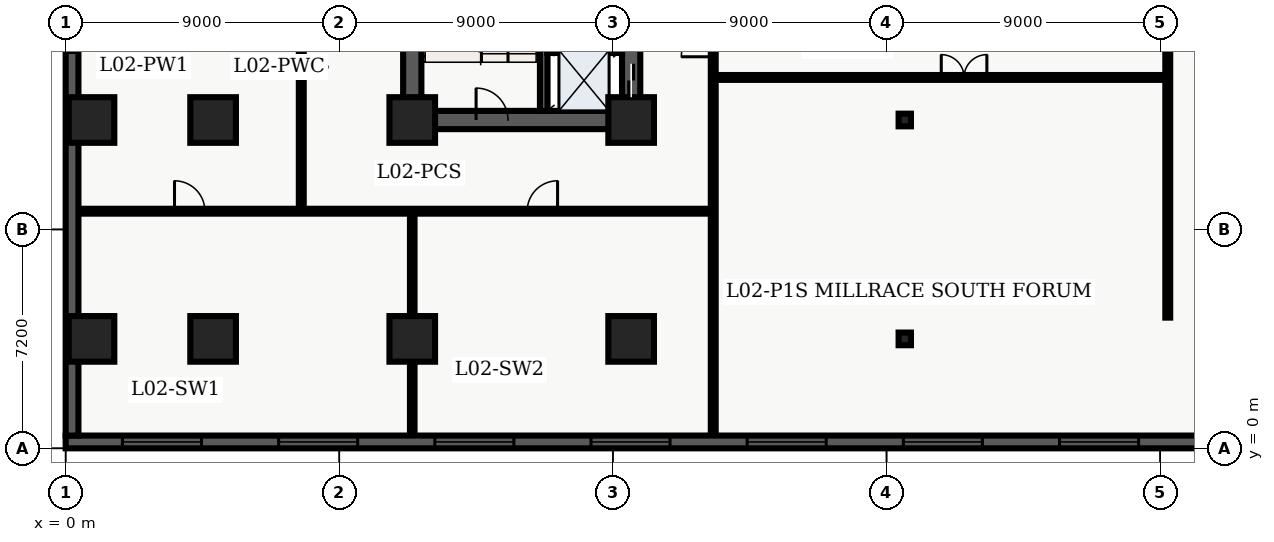
"""IFC4 building model, lengths in metres.
Left out: names, types, materials, properties, quantities, classifications, styles, units other than length and angle.
Written with IfcOpenShell. Run it as: python <this file> out.ifc"""

import sys

from ifc_helpers import new_model, entity, si_unit, converted_unit, direction, frame, origin_with_axes, origin_2d_with_axis, place, context, subcontext, project, spatial, polyline, rectangle, i_section, outline, extrude, element, fill, save


model = new_model("IFC4")
c1 = context("Model", 3, precision=1e-05, world=origin_with_axes(), true_north=direction((0.0, 1.0)))
c2 = subcontext(c1, "Body", "Model", "MODEL_VIEW")
j1 = project(units=[si_unit("LENGTHUNIT", "METRE"), converted_unit("PLANEANGLEUNIT", "DEGREE", entity("IfcPlaneAngleMeasure", 0.017), si_unit("PLANEANGLEUNIT", "RADIAN"), dimensions=[0, 0, 0, 0, 0, 0, 0])], contexts=[c1])
p1 = place(None, origin_with_axes())
s1 = spatial("IfcSite", under=j1, at=p1, CompositionType="ELEMENT")
p2 = place(p1, origin_with_axes())
s2 = spatial("IfcBuilding", under=s1, at=p2, CompositionType="ELEMENT")
p3 = place(p2, frame((0.0, 0.0, 10.8), z_axis=(0.0, 0.0, 1.0), x_axis=(1.0, 0.0, 0.0)))
s3 = spatial("IfcBuildingStorey", under=s2, at=p3, CompositionType="ELEMENT", Elevation=10.8)
p4 = place(p3, frame((11.4, 10.8, 0.0), z_axis=(0.0, 0.0, 1.0), x_axis=(0.0, 1.0, 0.0)))
e1 = element("IfcWall", 1, at=p4, inside=s3, PredefinedType="SHEAR", context=c2, shape_type="SweptSolid", body=[
    extrude(outline(polyline([(0.0, -0.3), (27.0, -0.3), (27.0, 0.3), (0.0, 0.3), (0.0, -0.3)])), origin_with_axes(), (0.0, 0.0, 1.0), 4.26),
])
p5 = place(p3, frame((11.4, 10.8, 0.0), z_axis=(0.0, 0.0, 1.0), x_axis=(1.0, 0.0, 0.0)))
e2 = element("IfcWall", 2, at=p5, inside=s3, PredefinedType="SHEAR", context=c2, shape_type="SweptSolid", body=[
    extrude(outline(polyline([(0.0, -0.3), (7.2, -0.3), (7.2, 0.3), (0.0, 0.3), (0.0, -0.3)])), origin_with_axes(), (0.0, 0.0, 1.0), 4.26),
])
p6 = place(p5, frame((2.625, 0.0, 0.0), z_axis=(0.0, 0.0, 1.0), x_axis=(1.0, 0.0, 0.0)))
e3 = element("IfcOpeningElement", 3, at=p6, cuts=e2, PredefinedType="OPENING", context=c2, shape_type="SweptSolid", body=[
    extrude(rectangle(XDim=1.05, YDim=0.62, at=origin_2d_with_axis()), origin_with_axes(), (0.0, 0.0, 1.0), 2.15),
])
p7 = place(p3, frame((18.6, 10.8, 0.0), z_axis=(0.0, 0.0, 1.0), x_axis=(0.0, 1.0, 0.0)))
e4 = element("IfcWall", 4, at=p7, inside=s3, PredefinedType="SHEAR", context=c2, shape_type="SweptSolid", body=[
    extrude(outline(polyline([(0.0, -0.3), (13.5, -0.3), (13.5, 0.3), (0.0, 0.3), (0.0, -0.3)])), origin_with_axes(), (0.0, 0.0, 1.0), 4.26),
])
p8 = place(p7, frame((1.3, 0.0, 0.0), z_axis=(0.0, 0.0, 1.0), x_axis=(1.0, 0.0, 0.0)))
e5 = element("IfcOpeningElement", 5, at=p8, cuts=e4, PredefinedType="OPENING", context=c2, shape_type="SweptSolid", body=[
    extrude(rectangle(XDim=1.1, YDim=0.62, at=origin_2d_with_axis()), origin_with_axes(), (0.0, 0.0, 1.0), 2.15),
])
p9 = place(p7, frame((3.4, 0.0, 0.0), z_axis=(0.0, 0.0, 1.0), x_axis=(1.0, 0.0, 0.0)))
e6 = element("IfcOpeningElement", 6, at=p9, cuts=e4, PredefinedType="OPENING", context=c2, shape_type="SweptSolid", body=[
    extrude(rectangle(XDim=1.1, YDim=0.62, at=origin_2d_with_axis()), origin_with_axes(), (0.0, 0.0, 1.0), 2.15),
])
p10 = place(p7, frame((11.125, 0.0, 0.0), z_axis=(0.0, 0.0, 1.0), x_axis=(1.0, 0.0, 0.0)))
e7 = element("IfcOpeningElement", 7, at=p10, cuts=e4, PredefinedType="OPENING", context=c2, shape_type="SweptSolid", body=[
    extrude(rectangle(XDim=1.05, YDim=0.62, at=origin_2d_with_axis()), origin_with_axes(), (0.0, 0.0, 1.0), 2.15),
])
p11 = place(p3, frame((15.725, 11.1, 0.0), z_axis=(0.0, 0.0, 1.0), x_axis=(0.0, 1.0, 0.0)))
e8 = element("IfcWall", 8, at=p11, inside=s3, PredefinedType="SHEAR", context=c2, shape_type="SweptSolid", body=[
    extrude(outline(polyline([(0.0, -0.125), (8.6, -0.125), (8.6, 0.125), (0.0, 0.125), (0.0, -0.125)])), origin_with_axes(), (0.0, 0.0, 1.0), 4.26),
])
for number, where, z_axis, x_axis in (
    (9, (11.4, 3.6, 0.0), (0.0, 0.0, 1.0), (1.0, 0.0, 0.0)),
    (10, (11.4, 10.8, 0.0), (0.0, 0.0, 1.0), (1.0, 0.0, 0.0)),
    (11, (18.6, 3.6, 0.0), (0.0, 0.0, 1.0), (1.0, 0.0, 0.0)),
    (12, (18.6, 10.8, 0.0), (0.0, 0.0, 1.0), (1.0, 0.0, 0.0)),
    (13, (4.85, 3.6, 0.0), (0.0, 0.0, 1.0), (1.0, 0.0, 0.0)),
    (14, (4.85, 10.8, 0.0), (0.0, 0.0, 1.0), (1.0, 0.0, 0.0)),
    (15, (0.85, 3.6, 0.0), (0.0, 0.0, 1.0), (1.0, 0.0, 0.0)),
    (16, (0.85, 10.8, 0.0), (0.0, 0.0, 1.0), (1.0, 0.0, 0.0)),
):
    element("IfcColumn", number, at=place(p3, frame(where, z_axis=z_axis, x_axis=x_axis)), inside=s3, PredefinedType="COLUMN", context=c2, shape_type="SweptSolid", body=[
        extrude(rectangle(XDim=1.5, YDim=1.5, at=origin_2d_with_axis()), origin_with_axes(), (0.0, 0.0, 1.0), 4.5),
    ])
for number, where, z_axis, x_axis in (
    (17, (27.6, 3.6, 0.0), (0.0, 0.0, 1.0), (1.0, 0.0, 0.0)),
    (18, (27.6, 10.8, 0.0), (0.0, 0.0, 1.0), (1.0, 0.0, 0.0)),
):
    element("IfcColumn", number, at=place(p3, frame(where, z_axis=z_axis, x_axis=x_axis)), inside=s3, PredefinedType="COLUMN", context=c2, shape_type="SweptSolid", body=[
        extrude(i_section(OverallWidth=0.406, OverallDepth=0.416, WebThickness=0.03, FlangeThickness=0.048, FilletRadius=0.022, at=origin_2d_with_axis()), origin_with_axes(), (0.0, 0.0, 1.0), 4.5),
    ])
p12 = place(p3, frame((15.84, 13.13, 0.0), z_axis=(0.0, 0.0, 1.0), x_axis=(1.0, 0.0, 0.0)))
e19 = element("IfcWall", 19, at=p12, inside=s3, PredefinedType="SOLIDWALL", context=c2, shape_type="SweptSolid", body=[
    extrude(outline(polyline([(0.0, -0.125), (2.46, -0.125), (2.46, 0.125), (0.0, 0.125), (0.0, -0.125)])), origin_with_axes(), (0.0, 0.0, 1.0), 3.2),
])
p13 = place(p3, frame((0.38, 7.8, 0.0), z_axis=(0.0, 0.0, 1.0), x_axis=(1.0, 0.0, 0.0)))
e20 = element("IfcWall", 20, at=p13, inside=s3, PredefinedType="PARTITIONING", context=c2, shape_type="SweptSolid", body=[
    extrude(outline(polyline([(0.0, -0.08), (20.92, -0.08), (20.92, 0.08), (0.0, 0.08), (0.0, -0.08)])), origin_with_axes(), (0.0, 0.0, 1.0), 3.2),
])
p14 = place(p13, frame((3.7, 0.0, 0.0), z_axis=(0.0, 0.0, 1.0), x_axis=(1.0, 0.0, 0.0)))
e21 = element("IfcOpeningElement", 21, at=p14, cuts=e20, PredefinedType="OPENING", context=c2, shape_type="SweptSolid", body=[
    extrude(rectangle(XDim=1.0, YDim=0.18, at=origin_2d_with_axis()), origin_with_axes(), (0.0, 0.0, 1.0), 2.15),
])
p15 = place(p13, frame((15.3, 0.0, 0.0), z_axis=(0.0, 0.0, 1.0), x_axis=(1.0, 0.0, 0.0)))
e22 = element("IfcOpeningElement", 22, at=p15, cuts=e20, PredefinedType="OPENING", context=c2, shape_type="SweptSolid", body=[
    extrude(rectangle(XDim=1.0, YDim=0.18, at=origin_2d_with_axis()), origin_with_axes(), (0.0, 0.0, 1.0), 2.15),
])
p16 = place(p3, frame((11.4, 0.38, 0.0), z_axis=(0.0, 0.0, 1.0), x_axis=(0.0, 1.0, 0.0)))
e23 = element("IfcWall", 23, at=p16, inside=s3, PredefinedType="PARTITIONING", context=c2, shape_type="SweptSolid", body=[
    extrude(outline(polyline([(0.0, -0.075), (7.42, -0.075), (7.42, 0.075), (0.0, 0.075), (0.0, -0.075)])), origin_with_axes(), (0.0, 0.0, 1.0), 3.2),
])
p17 = place(p3, frame((7.75, 7.8, 0.0), z_axis=(0.0, 0.0, 1.0), x_axis=(0.0, 1.0, 0.0)))
e24 = element("IfcWall", 24, at=p17, inside=s3, PredefinedType="PARTITIONING", context=c2, shape_type="SweptSolid", body=[
    extrude(outline(polyline([(0.0, -0.08), (32.6, -0.08), (32.6, 0.08), (0.0, 0.08), (0.0, -0.08)])), origin_with_axes(), (0.0, 0.0, 1.0), 3.2),
])
p18 = place(p17, frame((8.25, 0.0, 0.0), z_axis=(0.0, 0.0, 1.0), x_axis=(1.0, 0.0, 0.0)))
e25 = element("IfcOpeningElement", 25, at=p18, cuts=e24, PredefinedType="OPENING", context=c2, shape_type="SweptSolid", body=[
    extrude(rectangle(XDim=1.5, YDim=0.18, at=origin_2d_with_axis()), origin_with_axes(), (0.0, 0.0, 1.0), 2.2),
])
p19 = place(p17, frame((21.5, 0.0, 0.0), z_axis=(0.0, 0.0, 1.0), x_axis=(1.0, 0.0, 0.0)))
e26 = element("IfcOpeningElement", 26, at=p19, cuts=e24, PredefinedType="OPENING", context=c2, shape_type="SweptSolid", body=[
    extrude(rectangle(XDim=1.0, YDim=0.18, at=origin_2d_with_axis()), origin_with_axes(), (0.0, 0.0, 1.0), 2.15),
])
p20 = place(p3, frame((21.3, 0.38, 0.0), z_axis=(0.0, 0.0, 1.0), x_axis=(0.0, 1.0, 0.0)))
e27 = element("IfcWall", 27, at=p20, inside=s3, PredefinedType="PARTITIONING", context=c2, shape_type="SweptSolid", body=[
    extrude(outline(polyline([(0.0, -0.08), (38.84, -0.08), (38.84, 0.08), (0.0, 0.08), (0.0, -0.08)])), origin_with_axes(), (0.0, 0.0, 1.0), 3.2),
])
p21 = place(p20, frame((13.025, 0.0, 0.0), z_axis=(0.0, 0.0, 1.0), x_axis=(1.0, 0.0, 0.0)))
e28 = element("IfcOpeningElement", 28, at=p21, cuts=e27, PredefinedType="OPENING", context=c2, shape_type="SweptSolid", body=[
    extrude(rectangle(XDim=1.05, YDim=0.18, at=origin_2d_with_axis()), origin_with_axes(), (0.0, 0.0, 1.0), 2.15),
])
p22 = place(p20, frame((31.25, 0.0, 0.0), z_axis=(0.0, 0.0, 1.0), x_axis=(1.0, 0.0, 0.0)))
e29 = element("IfcOpeningElement", 29, at=p22, cuts=e27, PredefinedType="OPENING", context=c2, shape_type="SweptSolid", body=[
    extrude(rectangle(XDim=1.5, YDim=0.18, at=origin_2d_with_axis()), origin_with_axes(), (0.0, 0.0, 1.0), 2.2),
])
p23 = place(p3, frame((21.3, 12.2, 0.0), z_axis=(0.0, 0.0, 1.0), x_axis=(1.0, 0.0, 0.0)))
e30 = element("IfcWall", 30, at=p23, inside=s3, PredefinedType="PARTITIONING", context=c2, shape_type="SweptSolid", body=[
    extrude(outline(polyline([(0.0, -0.08), (14.95, -0.08), (14.95, 0.08), (0.0, 0.08), (0.0, -0.08)])), origin_with_axes(), (0.0, 0.0, 1.0), 3.2),
])
p24 = place(p23, frame((8.25, 0.0, 0.0), z_axis=(0.0, 0.0, 1.0), x_axis=(1.0, 0.0, 0.0)))
e31 = element("IfcOpeningElement", 31, at=p24, cuts=e30, PredefinedType="OPENING", context=c2, shape_type="SweptSolid", body=[
    extrude(rectangle(XDim=1.5, YDim=0.18, at=origin_2d_with_axis()), origin_with_axes(), (0.0, 0.0, 1.0), 2.2),
])
p25 = place(p3, frame((36.25, 4.3, 0.0), z_axis=(0.0, 0.0, 1.0), x_axis=(0.0, 1.0, 0.0)))
e32 = element("IfcWall", 32, at=p25, inside=s3, PredefinedType="PARTITIONING", context=c2, shape_type="SweptSolid", body=[
    extrude(outline(polyline([(0.0, -0.08), (22.5, -0.08), (22.5, 0.08), (0.0, 0.08), (0.0, -0.08)])), origin_with_axes(), (0.0, 0.0, 1.0), 3.2),
])
p26 = place(p3, frame((67.98, 0.21, 0.0), z_axis=(0.0, 0.0, 1.0), x_axis=(-1.0, 0.0, 0.0)))
e33 = element("IfcWall", 33, at=p26, inside=s3, PredefinedType="SOLIDWALL", context=c2, shape_type="SweptSolid", body=[
    extrude(outline(polyline([(0.0, -0.21), (67.98, -0.21), (67.98, 0.21), (0.0, 0.21), (0.0, -0.21)])), origin_with_axes(), (0.0, 0.0, 1.0), 4.26),
])
p27 = place(p26, frame((3.168, 0.0, 0.45), z_axis=(0.0, 0.0, 1.0), x_axis=(1.0, 0.0, 0.0)))
e34 = element("IfcOpeningElement", 34, at=p27, cuts=e33, PredefinedType="OPENING", context=c2, shape_type="SweptSolid", body=[
    extrude(rectangle(XDim=2.6, YDim=0.44, at=origin_2d_with_axis()), origin_with_axes(), (0.0, 0.0, 1.0), 2.8),
])
p28 = place(p26, frame((8.305, 0.0, 0.45), z_axis=(0.0, 0.0, 1.0), x_axis=(1.0, 0.0, 0.0)))
e35 = element("IfcOpeningElement", 35, at=p28, cuts=e33, PredefinedType="OPENING", context=c2, shape_type="SweptSolid", body=[
    extrude(rectangle(XDim=2.6, YDim=0.44, at=origin_2d_with_axis()), origin_with_axes(), (0.0, 0.0, 1.0), 2.8),
])
p29 = place(p26, frame((13.442, 0.0, 0.45), z_axis=(0.0, 0.0, 1.0), x_axis=(1.0, 0.0, 0.0)))
e36 = element("IfcOpeningElement", 36, at=p29, cuts=e33, PredefinedType="OPENING", context=c2, shape_type="SweptSolid", body=[
    extrude(rectangle(XDim=2.6, YDim=0.44, at=origin_2d_with_axis()), origin_with_axes(), (0.0, 0.0, 1.0), 2.8),
])
p30 = place(p26, frame((19.429, 0.0, 0.45), z_axis=(0.0, 0.0, 1.0), x_axis=(1.0, 0.0, 0.0)))
e37 = element("IfcOpeningElement", 37, at=p30, cuts=e33, PredefinedType="OPENING", context=c2, shape_type="SweptSolid", body=[
    extrude(rectangle(XDim=2.6, YDim=0.44, at=origin_2d_with_axis()), origin_with_axes(), (0.0, 0.0, 1.0), 2.8),
])
p31 = place(p26, frame((23.716, 0.0, 0.45), z_axis=(0.0, 0.0, 1.0), x_axis=(1.0, 0.0, 0.0)))
e38 = element("IfcOpeningElement", 38, at=p31, cuts=e33, PredefinedType="OPENING", context=c2, shape_type="SweptSolid", body=[
    extrude(rectangle(XDim=2.6, YDim=0.44, at=origin_2d_with_axis()), origin_with_axes(), (0.0, 0.0, 1.0), 2.8),
])
p32 = place(p26, frame((28.853, 0.0, 0.45), z_axis=(0.0, 0.0, 1.0), x_axis=(1.0, 0.0, 0.0)))
e39 = element("IfcOpeningElement", 39, at=p32, cuts=e33, PredefinedType="OPENING", context=c2, shape_type="SweptSolid", body=[
    extrude(rectangle(XDim=2.6, YDim=0.44, at=origin_2d_with_axis()), origin_with_axes(), (0.0, 0.0, 1.0), 2.8),
])
p33 = place(p26, frame((33.99, 0.0, 0.45), z_axis=(0.0, 0.0, 1.0), x_axis=(1.0, 0.0, 0.0)))
e40 = element("IfcOpeningElement", 40, at=p33, cuts=e33, PredefinedType="OPENING", context=c2, shape_type="SweptSolid", body=[
    extrude(rectangle(XDim=2.6, YDim=0.44, at=origin_2d_with_axis()), origin_with_axes(), (0.0, 0.0, 1.0), 2.8),
])
p34 = place(p26, frame((39.127, 0.0, 0.45), z_axis=(0.0, 0.0, 1.0), x_axis=(1.0, 0.0, 0.0)))
e41 = element("IfcOpeningElement", 41, at=p34, cuts=e33, PredefinedType="OPENING", context=c2, shape_type="SweptSolid", body=[
    extrude(rectangle(XDim=2.6, YDim=0.44, at=origin_2d_with_axis()), origin_with_axes(), (0.0, 0.0, 1.0), 2.8),
])
p35 = place(p26, frame((44.264, 0.0, 0.45), z_axis=(0.0, 0.0, 1.0), x_axis=(1.0, 0.0, 0.0)))
e42 = element("IfcOpeningElement", 42, at=p35, cuts=e33, PredefinedType="OPENING", context=c2, shape_type="SweptSolid", body=[
    extrude(rectangle(XDim=2.6, YDim=0.44, at=origin_2d_with_axis()), origin_with_axes(), (0.0, 0.0, 1.0), 2.8),
])
p36 = place(p26, frame((49.401, 0.0, 0.45), z_axis=(0.0, 0.0, 1.0), x_axis=(1.0, 0.0, 0.0)))
e43 = element("IfcOpeningElement", 43, at=p36, cuts=e33, PredefinedType="OPENING", context=c2, shape_type="SweptSolid", body=[
    extrude(rectangle(XDim=2.6, YDim=0.44, at=origin_2d_with_axis()), origin_with_axes(), (0.0, 0.0, 1.0), 2.8),
])
p37 = place(p26, frame((54.538, 0.0, 0.45), z_axis=(0.0, 0.0, 1.0), x_axis=(1.0, 0.0, 0.0)))
e44 = element("IfcOpeningElement", 44, at=p37, cuts=e33, PredefinedType="OPENING", context=c2, shape_type="SweptSolid", body=[
    extrude(rectangle(XDim=2.6, YDim=0.44, at=origin_2d_with_axis()), origin_with_axes(), (0.0, 0.0, 1.0), 2.8),
])
p38 = place(p26, frame((59.675, 0.0, 0.45), z_axis=(0.0, 0.0, 1.0), x_axis=(1.0, 0.0, 0.0)))
e45 = element("IfcOpeningElement", 45, at=p38, cuts=e33, PredefinedType="OPENING", context=c2, shape_type="SweptSolid", body=[
    extrude(rectangle(XDim=2.6, YDim=0.44, at=origin_2d_with_axis()), origin_with_axes(), (0.0, 0.0, 1.0), 2.8),
])
p39 = place(p26, frame((64.812, 0.0, 0.45), z_axis=(0.0, 0.0, 1.0), x_axis=(1.0, 0.0, 0.0)))
e46 = element("IfcOpeningElement", 46, at=p39, cuts=e33, PredefinedType="OPENING", context=c2, shape_type="SweptSolid", body=[
    extrude(rectangle(XDim=2.6, YDim=0.44, at=origin_2d_with_axis()), origin_with_axes(), (0.0, 0.0, 1.0), 2.8),
])
p40 = place(p3, frame((0.21, 0.42, 0.0), z_axis=(0.0, 0.0, 1.0), x_axis=(0.0, 1.0, 0.0)))
e47 = element("IfcWall", 47, at=p40, inside=s3, PredefinedType="SOLIDWALL", context=c2, shape_type="SweptSolid", body=[
    extrude(outline(polyline([(0.0, -0.21), (49.08, -0.21), (49.08, 0.21), (0.0, 0.21), (0.0, -0.21)])), origin_with_axes(), (0.0, 0.0, 1.0), 4.26),
])
p41 = place(p40, frame((13.9, 0.0, 0.45), z_axis=(0.0, 0.0, 1.0), x_axis=(1.0, 0.0, 0.0)))
e48 = element("IfcOpeningElement", 48, at=p41, cuts=e47, PredefinedType="OPENING", context=c2, shape_type="SweptSolid", body=[
    extrude(rectangle(XDim=2.6, YDim=0.44, at=origin_2d_with_axis()), origin_with_axes(), (0.0, 0.0, 1.0), 2.8),
])
p42 = place(p40, frame((20.07, 0.0, 0.45), z_axis=(0.0, 0.0, 1.0), x_axis=(1.0, 0.0, 0.0)))
e49 = element("IfcOpeningElement", 49, at=p42, cuts=e47, PredefinedType="OPENING", context=c2, shape_type="SweptSolid", body=[
    extrude(rectangle(XDim=2.6, YDim=0.44, at=origin_2d_with_axis()), origin_with_axes(), (0.0, 0.0, 1.0), 2.8),
])
p43 = place(p40, frame((24.54, 0.0, 0.45), z_axis=(0.0, 0.0, 1.0), x_axis=(1.0, 0.0, 0.0)))
e50 = element("IfcOpeningElement", 50, at=p43, cuts=e47, PredefinedType="OPENING", context=c2, shape_type="SweptSolid", body=[
    extrude(rectangle(XDim=2.6, YDim=0.44, at=origin_2d_with_axis()), origin_with_axes(), (0.0, 0.0, 1.0), 2.8),
])
p44 = place(p40, frame((34.73, 0.0, 0.45), z_axis=(0.0, 0.0, 1.0), x_axis=(1.0, 0.0, 0.0)))
e51 = element("IfcOpeningElement", 51, at=p44, cuts=e47, PredefinedType="OPENING", context=c2, shape_type="SweptSolid", body=[
    extrude(rectangle(XDim=2.6, YDim=0.44, at=origin_2d_with_axis()), origin_with_axes(), (0.0, 0.0, 1.0), 2.8),
])
p45 = place(p7, frame((1.3, 0.0, 0.0), z_axis=(0.0, 0.0, 1.0), x_axis=(1.0, 0.0, 0.0)))
e52 = element("IfcDoor", 52, at=p45, inside=s3, OperationType="SLIDING_TO_LEFT", PredefinedType="DOOR", context=c2, shape_type="SweptSolid", body=[
    extrude(rectangle(XDim=1.1, YDim=0.09, at=origin_2d_with_axis()), origin_with_axes(), (0.0, 0.0, 1.0), 2.15),
])
fill(e5, e52)
p46 = place(p5, frame((2.625, 0.0, 0.0), z_axis=(0.0, 0.0, 1.0), x_axis=(1.0, 0.0, 0.0)))
e53 = element("IfcDoor", 53, at=p46, inside=s3, OperationType="SINGLE_SWING_LEFT", PredefinedType="DOOR", context=c2, shape_type="SweptSolid", body=[
    extrude(rectangle(XDim=1.05, YDim=0.09, at=origin_2d_with_axis()), origin_with_axes(), (0.0, 0.0, 1.0), 2.15),
])
fill(e3, e53)
p47 = place(p20, frame((13.025, 0.0, 0.0), z_axis=(0.0, 0.0, 1.0), x_axis=(1.0, 0.0, 0.0)))
e54 = element("IfcDoor", 54, at=p47, inside=s3, OperationType="SINGLE_SWING_LEFT", PredefinedType="DOOR", context=c2, shape_type="SweptSolid", body=[
    extrude(rectangle(XDim=1.05, YDim=0.09, at=origin_2d_with_axis()), origin_with_axes(), (0.0, 0.0, 1.0), 2.15),
])
fill(e28, e54)
p48 = place(p13, frame((3.7, 0.0, 0.0), z_axis=(0.0, 0.0, 1.0), x_axis=(1.0, 0.0, 0.0)))
e55 = element("IfcDoor", 55, at=p48, inside=s3, OperationType="SINGLE_SWING_LEFT", PredefinedType="DOOR", context=c2, shape_type="SweptSolid", body=[
    extrude(rectangle(XDim=1.0, YDim=0.09, at=origin_2d_with_axis()), origin_with_axes(), (0.0, 0.0, 1.0), 2.15),
])
fill(e21, e55)
p49 = place(p13, frame((15.3, 0.0, 0.0), z_axis=(0.0, 0.0, 1.0), x_axis=(1.0, 0.0, 0.0)))
e56 = element("IfcDoor", 56, at=p49, inside=s3, OperationType="SINGLE_SWING_RIGHT", PredefinedType="DOOR", context=c2, shape_type="SweptSolid", body=[
    extrude(rectangle(XDim=1.0, YDim=0.09, at=origin_2d_with_axis()), origin_with_axes(), (0.0, 0.0, 1.0), 2.15),
])
fill(e22, e56)
p50 = place(p23, frame((8.25, 0.0, 0.0), z_axis=(0.0, 0.0, 1.0), x_axis=(1.0, 0.0, 0.0)))
e57 = element("IfcDoor", 57, at=p50, inside=s3, OperationType="DOUBLE_DOOR_SINGLE_SWING", PredefinedType="DOOR", context=c2, shape_type="SweptSolid", body=[
    extrude(rectangle(XDim=1.5, YDim=0.09, at=origin_2d_with_axis()), origin_with_axes(), (0.0, 0.0, 1.0), 2.2),
])
fill(e31, e57)
p51 = place(p26, frame((33.99, 0.0, 0.45), z_axis=(0.0, 0.0, 1.0), x_axis=(1.0, 0.0, 0.0)))
e58 = element("IfcWindow", 58, at=p51, inside=s3, PredefinedType="WINDOW", context=c2, shape_type="SweptSolid", body=[
    extrude(rectangle(XDim=2.6, YDim=0.09, at=origin_2d_with_axis()), origin_with_axes(), (0.0, 0.0, 1.0), 2.8),
])
fill(e40, e58)
p52 = place(p26, frame((39.127, 0.0, 0.45), z_axis=(0.0, 0.0, 1.0), x_axis=(1.0, 0.0, 0.0)))
e59 = element("IfcWindow", 59, at=p52, inside=s3, PredefinedType="WINDOW", context=c2, shape_type="SweptSolid", body=[
    extrude(rectangle(XDim=2.6, YDim=0.09, at=origin_2d_with_axis()), origin_with_axes(), (0.0, 0.0, 1.0), 2.8),
])
fill(e41, e59)
p53 = place(p26, frame((44.264, 0.0, 0.45), z_axis=(0.0, 0.0, 1.0), x_axis=(1.0, 0.0, 0.0)))
e60 = element("IfcWindow", 60, at=p53, inside=s3, PredefinedType="WINDOW", context=c2, shape_type="SweptSolid", body=[
    extrude(rectangle(XDim=2.6, YDim=0.09, at=origin_2d_with_axis()), origin_with_axes(), (0.0, 0.0, 1.0), 2.8),
])
fill(e42, e60)
p54 = place(p26, frame((49.401, 0.0, 0.45), z_axis=(0.0, 0.0, 1.0), x_axis=(1.0, 0.0, 0.0)))
e61 = element("IfcWindow", 61, at=p54, inside=s3, PredefinedType="WINDOW", context=c2, shape_type="SweptSolid", body=[
    extrude(rectangle(XDim=2.6, YDim=0.09, at=origin_2d_with_axis()), origin_with_axes(), (0.0, 0.0, 1.0), 2.8),
])
fill(e43, e61)
p55 = place(p26, frame((54.538, 0.0, 0.45), z_axis=(0.0, 0.0, 1.0), x_axis=(1.0, 0.0, 0.0)))
e62 = element("IfcWindow", 62, at=p55, inside=s3, PredefinedType="WINDOW", context=c2, shape_type="SweptSolid", body=[
    extrude(rectangle(XDim=2.6, YDim=0.09, at=origin_2d_with_axis()), origin_with_axes(), (0.0, 0.0, 1.0), 2.8),
])
fill(e44, e62)
p56 = place(p26, frame((59.675, 0.0, 0.45), z_axis=(0.0, 0.0, 1.0), x_axis=(1.0, 0.0, 0.0)))
e63 = element("IfcWindow", 63, at=p56, inside=s3, PredefinedType="WINDOW", context=c2, shape_type="SweptSolid", body=[
    extrude(rectangle(XDim=2.6, YDim=0.09, at=origin_2d_with_axis()), origin_with_axes(), (0.0, 0.0, 1.0), 2.8),
])
fill(e45, e63)
p57 = place(p26, frame((64.812, 0.0, 0.45), z_axis=(0.0, 0.0, 1.0), x_axis=(1.0, 0.0, 0.0)))
e64 = element("IfcWindow", 64, at=p57, inside=s3, PredefinedType="WINDOW", context=c2, shape_type="SweptSolid", body=[
    extrude(rectangle(XDim=2.6, YDim=0.09, at=origin_2d_with_axis()), origin_with_axes(), (0.0, 0.0, 1.0), 2.8),
])
fill(e46, e64)
p58 = place(p40, frame((13.9, 0.0, 0.45), z_axis=(0.0, 0.0, 1.0), x_axis=(1.0, 0.0, 0.0)))
e65 = element("IfcWindow", 65, at=p58, inside=s3, PredefinedType="WINDOW", context=c2, shape_type="SweptSolid", body=[
    extrude(rectangle(XDim=2.6, YDim=0.09, at=origin_2d_with_axis()), origin_with_axes(), (0.0, 0.0, 1.0), 2.8),
])
fill(e48, e65)
save(model, sys.argv[1])
